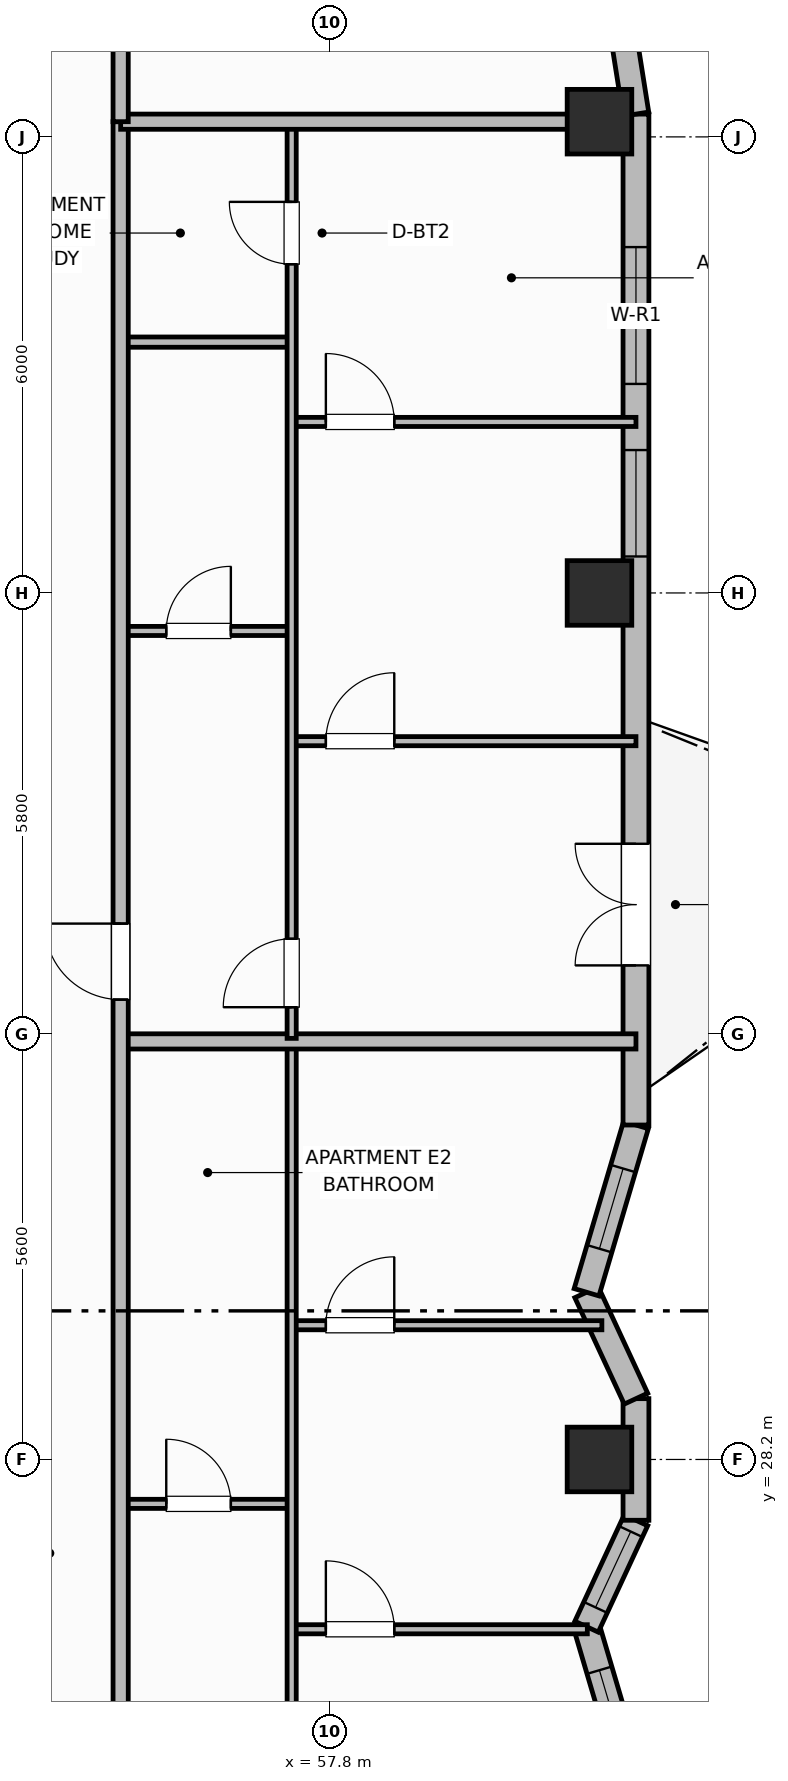
"""IFC4 building model, lengths in metres.
Left out: names, types, materials, properties, quantities, classifications, styles, units other than length and angle.
Written with IfcOpenShell. Run it as: python <this file> out.ifc"""

import sys

from ifc_helpers import new_model, si_unit, direction, frame, frame_2d, origin, origin_2d, place, context, subcontext, project, spatial, rectangle, extrude, element, fill, save


model = new_model("IFC4")
c1 = context("Model", 3, precision=1e-05, world=origin(), true_north=direction((0.0, 1.0)))
c2 = subcontext(c1, "Body", "Model", "MODEL_VIEW")
j1 = project(units=[si_unit("LENGTHUNIT", "METRE"), si_unit("PLANEANGLEUNIT", "RADIAN")], contexts=[c1])
p1 = place(None, origin())
s1 = spatial("IfcSite", under=j1, at=p1, CompositionType="ELEMENT")
p2 = place(p1, origin())
s2 = spatial("IfcBuilding", under=s1, at=p2, CompositionType="ELEMENT")
p3 = place(p2, frame((0.0, 0.0, 214.7)))
s3 = spatial("IfcBuildingStorey", under=s2, at=p3, CompositionType="ELEMENT", Elevation=214.7)
for number, where, z_axis, x_axis in (
    (1, (61.35, 28.2, 0.0), (0.0, 0.0, 1.0), (1.0, 0.0, 0.0)),
    (2, (61.35, 39.6, 0.0), (0.0, 0.0, 1.0), (1.0, 0.0, 0.0)),
    (3, (61.35, 45.8, 0.0), (0.0, 0.0, 1.0), (1.0, 0.0, 0.0)),
):
    element("IfcColumn", number, at=place(p3, frame(where, z_axis=z_axis, x_axis=x_axis)), inside=s3, PredefinedType="COLUMN", context=c2, shape_type="SweptSolid", body=[
        extrude(rectangle(XDim=0.85, YDim=0.85, at=origin_2d()), origin(), (0.0, 0.0, 1.0), 3.7),
    ])
p4 = place(p3, frame((61.83, 23.8, 0.0), z_axis=(0.0, 0.0, 1.0), x_axis=(-0.283410652833, 0.958998645391, 0.0)))
e4 = element("IfcWall", 4, at=p4, inside=s3, PredefinedType="SOLIDWALL", context=c2, shape_type="SweptSolid", body=[
    extrude(rectangle(XDim=2.294, YDim=0.34, at=frame_2d((1.147, 0.0))), origin(), (0.0, 0.0, 1.0), 2.72),
])
p5 = place(p4, frame((0.597, 0.0, 0.91)))
e5 = element("IfcOpeningElement", 5, at=p5, cuts=e4, PredefinedType="OPENING", context=c2, shape_type="SweptSolid", body=[
    extrude(rectangle(XDim=1.1, YDim=1.65, at=frame_2d((0.55, 0.825))), frame((0.0, 0.18, 0.0), z_axis=(0.0, -1.0, 0.0), x_axis=(1.0, 0.0, 0.0)), (0.0, 0.0, 1.0), 0.36),
])
p6 = place(p3, frame((61.18, 26.0, 0.0), z_axis=(0.0, 0.0, 1.0), x_axis=(0.421213543339, 0.906961493619, 0.0)))
e6 = element("IfcWall", 6, at=p6, inside=s3, PredefinedType="SOLIDWALL", context=c2, shape_type="SweptSolid", body=[
    extrude(rectangle(XDim=1.543, YDim=0.34, at=frame_2d((0.772, 0.0))), origin(), (0.0, 0.0, 1.0), 2.72),
])
p7 = place(p6, frame((0.28, 0.0, 0.91)))
e7 = element("IfcOpeningElement", 7, at=p7, cuts=e6, PredefinedType="OPENING", context=c2, shape_type="SweptSolid", body=[
    extrude(rectangle(XDim=1.1, YDim=1.65, at=frame_2d((0.55, 0.825))), frame((0.0, 0.18, 0.0), z_axis=(0.0, -1.0, 0.0), x_axis=(1.0, 0.0, 0.0)), (0.0, 0.0, 1.0), 0.36),
])
p8 = place(p3, frame((61.83, 27.4, 0.0), z_axis=(0.0, 0.0, 1.0), x_axis=(0.0, 1.0, 0.0)))
e8 = element("IfcWall", 8, at=p8, inside=s3, PredefinedType="SOLIDWALL", context=c2, shape_type="SweptSolid", body=[
    extrude(rectangle(XDim=1.6, YDim=0.34, at=frame_2d((0.8, 0.0))), origin(), (0.0, 0.0, 1.0), 2.72),
])
p9 = place(p3, frame((61.83, 29.0, 0.0), z_axis=(0.0, 0.0, 1.0), x_axis=(-0.421213543339, 0.906961493619, 0.0)))
e9 = element("IfcWall", 9, at=p9, inside=s3, PredefinedType="SOLIDWALL", context=c2, shape_type="SweptSolid", body=[
    extrude(rectangle(XDim=1.543, YDim=0.34, at=frame_2d((0.772, 0.0))), origin(), (0.0, 0.0, 1.0), 2.72),
])
p10 = place(p3, frame((61.18, 30.4, 0.0), z_axis=(0.0, 0.0, 1.0), x_axis=(0.283381730269, 0.959007192335, 0.0)))
e10 = element("IfcWall", 10, at=p10, inside=s3, PredefinedType="SOLIDWALL", context=c2, shape_type="SweptSolid", body=[
    extrude(rectangle(XDim=2.294, YDim=0.34, at=frame_2d((1.147, 0.0))), origin(), (0.0, 0.0, 1.0), 2.72),
])
p11 = place(p10, frame((0.597, 0.0, 0.91)))
e11 = element("IfcOpeningElement", 11, at=p11, cuts=e10, PredefinedType="OPENING", context=c2, shape_type="SweptSolid", body=[
    extrude(rectangle(XDim=1.1, YDim=1.65, at=frame_2d((0.55, 0.825))), frame((0.0, 0.18, 0.0), z_axis=(0.0, -1.0, 0.0), x_axis=(1.0, 0.0, 0.0)), (0.0, 0.0, 1.0), 0.36),
])
p12 = place(p3, frame((61.83, 32.6, 0.0), z_axis=(0.0, 0.0, 1.0), x_axis=(0.0, 1.0, 0.0)))
e12 = element("IfcWall", 12, at=p12, inside=s3, PredefinedType="SOLIDWALL", context=c2, shape_type="SweptSolid", body=[
    extrude(rectangle(XDim=13.3, YDim=0.34, at=frame_2d((6.65, 0.0))), origin(), (0.0, 0.0, 1.0), 2.72),
])
p13 = place(p12, frame((2.1, 0.0, 0.0)))
e13 = element("IfcOpeningElement", 13, at=p13, cuts=e12, PredefinedType="OPENING", context=c2, shape_type="SweptSolid", body=[
    extrude(rectangle(XDim=1.6, YDim=2.1, at=frame_2d((0.8, 1.05))), frame((0.0, 0.18, 0.0), z_axis=(0.0, -1.0, 0.0), x_axis=(1.0, 0.0, 0.0)), (0.0, 0.0, 1.0), 0.36),
])
p14 = place(p12, frame((7.48, 0.0, 0.71)))
e14 = element("IfcOpeningElement", 14, at=p14, cuts=e12, PredefinedType="OPENING", context=c2, shape_type="SweptSolid", body=[
    extrude(rectangle(XDim=1.4, YDim=1.85, at=frame_2d((0.7, 0.925))), frame((0.0, 0.18, 0.0), z_axis=(0.0, -1.0, 0.0), x_axis=(1.0, 0.0, 0.0)), (0.0, 0.0, 1.0), 0.36),
])
p15 = place(p12, frame((9.75, 0.0, 0.75)))
e15 = element("IfcOpeningElement", 15, at=p15, cuts=e12, PredefinedType="OPENING", context=c2, shape_type="SweptSolid", body=[
    extrude(rectangle(XDim=1.8, YDim=1.85, at=frame_2d((0.9, 0.925))), frame((0.0, 0.18, 0.0), z_axis=(0.0, -1.0, 0.0), x_axis=(1.0, 0.0, 0.0)), (0.0, 0.0, 1.0), 0.36),
])
p16 = place(p3, frame((61.83, 45.9, 0.0), z_axis=(0.0, 0.0, 1.0), x_axis=(-0.156481329164, 0.987680916907, 0.0)))
e16 = element("IfcWall", 16, at=p16, inside=s3, PredefinedType="SOLIDWALL", context=c2, shape_type="SweptSolid", body=[
    extrude(rectangle(XDim=1.136, YDim=0.34, at=frame_2d((0.568, 0.0))), origin(), (0.0, 0.0, 1.0), 2.72),
])
p17 = place(p3, frame((55.05, 27.616, 0.0), z_axis=(0.0, 0.0, 1.0), x_axis=(1.0, 0.0, 0.0)))
e17 = element("IfcWall", 17, at=p17, inside=s3, PredefinedType="PARTITIONING", context=c2, shape_type="SweptSolid", body=[
    extrude(rectangle(XDim=2.25, YDim=0.12, at=frame_2d((1.125, 0.0))), origin(), (0.0, 0.0, 1.0), 2.55),
])
p18 = place(p17, frame((0.6, 0.0, 0.0)))
e18 = element("IfcOpeningElement", 18, at=p18, cuts=e17, PredefinedType="OPENING", context=c2, shape_type="SweptSolid", body=[
    extrude(rectangle(XDim=0.85, YDim=2.1, at=frame_2d((0.425, 1.05))), frame((0.0, 0.07, 0.0), z_axis=(0.0, -1.0, 0.0), x_axis=(1.0, 0.0, 0.0)), (0.0, 0.0, 1.0), 0.14),
])
p19 = place(p3, frame((57.3, 25.966, 0.0), z_axis=(0.0, 0.0, 1.0), x_axis=(1.0, 0.0, 0.0)))
e19 = element("IfcWall", 19, at=p19, inside=s3, PredefinedType="PARTITIONING", context=c2, shape_type="SweptSolid", body=[
    extrude(rectangle(XDim=3.89, YDim=0.12, at=frame_2d((1.945, 0.0))), origin(), (0.0, 0.0, 1.0), 2.55),
])
p20 = place(p19, frame((0.45, 0.0, 0.0)))
e20 = element("IfcOpeningElement", 20, at=p20, cuts=e19, PredefinedType="OPENING", context=c2, shape_type="SweptSolid", body=[
    extrude(rectangle(XDim=0.9, YDim=2.1, at=frame_2d((0.45, 1.05))), frame((0.0, 0.07, 0.0), z_axis=(0.0, -1.0, 0.0), x_axis=(1.0, 0.0, 0.0)), (0.0, 0.0, 1.0), 0.14),
])
p21 = place(p3, frame((57.3, 29.966, 0.0), z_axis=(0.0, 0.0, 1.0), x_axis=(1.0, 0.0, 0.0)))
e21 = element("IfcWall", 21, at=p21, inside=s3, PredefinedType="PARTITIONING", context=c2, shape_type="SweptSolid", body=[
    extrude(rectangle(XDim=4.082, YDim=0.12, at=frame_2d((2.041, 0.0))), origin(), (0.0, 0.0, 1.0), 2.55),
])
p22 = place(p21, frame((0.45, 0.0, 0.0)))
e22 = element("IfcOpeningElement", 22, at=p22, cuts=e21, PredefinedType="OPENING", context=c2, shape_type="SweptSolid", body=[
    extrude(rectangle(XDim=0.9, YDim=2.1, at=frame_2d((0.45, 1.05))), frame((0.0, 0.07, 0.0), z_axis=(0.0, -1.0, 0.0), x_axis=(1.0, 0.0, 0.0)), (0.0, 0.0, 1.0), 0.14),
])
p23 = place(p3, frame((57.3, 22.256, 0.0), z_axis=(0.0, 0.0, 1.0), x_axis=(0.0, 1.0, 0.0)))
e23 = element("IfcWall", 23, at=p23, inside=s3, PredefinedType="PARTITIONING", context=c2, shape_type="SweptSolid", body=[
    extrude(rectangle(XDim=11.404, YDim=0.12, at=frame_2d((5.702, 0.0))), origin(), (0.0, 0.0, 1.0), 2.55),
])
p24 = place(p23, frame((0.41, 0.0, 0.0)))
e24 = element("IfcOpeningElement", 24, at=p24, cuts=e23, PredefinedType="OPENING", context=c2, shape_type="SweptSolid", body=[
    extrude(rectangle(XDim=0.9, YDim=2.1, at=frame_2d((0.45, 1.05))), frame((0.0, 0.07, 0.0), z_axis=(0.0, -1.0, 0.0), x_axis=(1.0, 0.0, 0.0)), (0.0, 0.0, 1.0), 0.14),
])
p25 = place(p3, frame((55.05, 33.7, 0.0), z_axis=(0.0, 0.0, 1.0), x_axis=(1.0, 0.0, 0.0)))
e25 = element("IfcWall", 25, at=p25, inside=s3, PredefinedType="PARTITIONING", context=c2, shape_type="SweptSolid", body=[
    extrude(rectangle(XDim=6.78, YDim=0.2, at=frame_2d((3.39, 0.0))), origin(), (0.0, 0.0, 1.0), 2.55),
])
p26 = place(p3, frame((55.05, 39.1, 0.0), z_axis=(0.0, 0.0, 1.0), x_axis=(1.0, 0.0, 0.0)))
e26 = element("IfcWall", 26, at=p26, inside=s3, PredefinedType="PARTITIONING", context=c2, shape_type="SweptSolid", body=[
    extrude(rectangle(XDim=2.25, YDim=0.12, at=frame_2d((1.125, 0.0))), origin(), (0.0, 0.0, 1.0), 2.55),
])
p27 = place(p26, frame((0.6, 0.0, 0.0)))
e27 = element("IfcOpeningElement", 27, at=p27, cuts=e26, PredefinedType="OPENING", context=c2, shape_type="SweptSolid", body=[
    extrude(rectangle(XDim=0.85, YDim=2.1, at=frame_2d((0.425, 1.05))), frame((0.0, 0.07, 0.0), z_axis=(0.0, -1.0, 0.0), x_axis=(1.0, 0.0, 0.0)), (0.0, 0.0, 1.0), 0.14),
])
p28 = place(p3, frame((55.05, 42.9, 0.0), z_axis=(0.0, 0.0, 1.0), x_axis=(1.0, 0.0, 0.0)))
e28 = element("IfcWall", 28, at=p28, inside=s3, PredefinedType="PARTITIONING", context=c2, shape_type="SweptSolid", body=[
    extrude(rectangle(XDim=2.25, YDim=0.135, at=frame_2d((1.125, 0.0))), origin(), (0.0, 0.0, 1.0), 2.55),
])
p29 = place(p3, frame((57.3, 37.65, 0.0), z_axis=(0.0, 0.0, 1.0), x_axis=(1.0, 0.0, 0.0)))
e29 = element("IfcWall", 29, at=p29, inside=s3, PredefinedType="PARTITIONING", context=c2, shape_type="SweptSolid", body=[
    extrude(rectangle(XDim=4.53, YDim=0.12, at=frame_2d((2.265, 0.0))), origin(), (0.0, 0.0, 1.0), 2.55),
])
p30 = place(p29, frame((0.45, 0.0, 0.0)))
e30 = element("IfcOpeningElement", 30, at=p30, cuts=e29, PredefinedType="OPENING", context=c2, shape_type="SweptSolid", body=[
    extrude(rectangle(XDim=0.9, YDim=2.1, at=frame_2d((0.45, 1.05))), frame((0.0, 0.07, 0.0), z_axis=(0.0, -1.0, 0.0), x_axis=(1.0, 0.0, 0.0)), (0.0, 0.0, 1.0), 0.14),
])
p31 = place(p3, frame((57.3, 41.85, 0.0), z_axis=(0.0, 0.0, 1.0), x_axis=(1.0, 0.0, 0.0)))
e31 = element("IfcWall", 31, at=p31, inside=s3, PredefinedType="PARTITIONING", context=c2, shape_type="SweptSolid", body=[
    extrude(rectangle(XDim=4.53, YDim=0.12, at=frame_2d((2.265, 0.0))), origin(), (0.0, 0.0, 1.0), 2.55),
])
p32 = place(p31, frame((0.45, 0.0, 0.0)))
e32 = element("IfcOpeningElement", 32, at=p32, cuts=e31, PredefinedType="OPENING", context=c2, shape_type="SweptSolid", body=[
    extrude(rectangle(XDim=0.9, YDim=2.1, at=frame_2d((0.45, 1.05))), frame((0.0, 0.07, 0.0), z_axis=(0.0, -1.0, 0.0), x_axis=(1.0, 0.0, 0.0)), (0.0, 0.0, 1.0), 0.14),
])
p33 = place(p3, frame((57.3, 33.74, 0.0), z_axis=(0.0, 0.0, 1.0), x_axis=(0.0, 1.0, 0.0)))
e33 = element("IfcWall", 33, at=p33, inside=s3, PredefinedType="PARTITIONING", context=c2, shape_type="SweptSolid", body=[
    extrude(rectangle(XDim=12.02, YDim=0.12, at=frame_2d((6.01, 0.0))), origin(), (0.0, 0.0, 1.0), 2.55),
])
p34 = place(p33, frame((0.41, 0.0, 0.0)))
e34 = element("IfcOpeningElement", 34, at=p34, cuts=e33, PredefinedType="OPENING", context=c2, shape_type="SweptSolid", body=[
    extrude(rectangle(XDim=0.9, YDim=2.1, at=frame_2d((0.45, 1.05))), frame((0.0, 0.07, 0.0), z_axis=(0.0, -1.0, 0.0), x_axis=(1.0, 0.0, 0.0)), (0.0, 0.0, 1.0), 0.14),
])
p35 = place(p33, frame((10.185, 0.0, 0.0)))
e35 = element("IfcOpeningElement", 35, at=p35, cuts=e33, PredefinedType="OPENING", context=c2, shape_type="SweptSolid", body=[
    extrude(rectangle(XDim=0.82, YDim=2.08, at=frame_2d((0.41, 1.04))), frame((0.0, 0.07, 0.0), z_axis=(0.0, -1.0, 0.0), x_axis=(1.0, 0.0, 0.0)), (0.0, 0.0, 1.0), 0.14),
])
p36 = place(p3, frame((55.05, 10.6, 0.0), z_axis=(0.0, 0.0, 1.0), x_axis=(0.0, 1.0, 0.0)))
e36 = element("IfcWall", 36, at=p36, inside=s3, PredefinedType="PARTITIONING", context=c2, shape_type="SweptSolid", body=[
    extrude(rectangle(XDim=35.2, YDim=0.2, at=frame_2d((17.6, 0.0))), origin(), (0.0, 0.0, 1.0), 2.55),
])
p37 = place(p36, frame((2.65, 0.0, 0.0)))
e37 = element("IfcOpeningElement", 37, at=p37, cuts=e36, PredefinedType="OPENING", context=c2, shape_type="SweptSolid", body=[
    extrude(rectangle(XDim=1.0, YDim=2.15, at=frame_2d((0.5, 1.075))), frame((0.0, 0.11, 0.0), z_axis=(0.0, -1.0, 0.0), x_axis=(1.0, 0.0, 0.0)), (0.0, 0.0, 1.0), 0.22),
])
p38 = place(p36, frame((12.166, 0.0, 0.0)))
e38 = element("IfcOpeningElement", 38, at=p38, cuts=e36, PredefinedType="OPENING", context=c2, shape_type="SweptSolid", body=[
    extrude(rectangle(XDim=1.0, YDim=2.15, at=frame_2d((0.5, 1.075))), frame((0.0, 0.11, 0.0), z_axis=(0.0, -1.0, 0.0), x_axis=(1.0, 0.0, 0.0)), (0.0, 0.0, 1.0), 0.22),
])
p39 = place(p36, frame((23.65, 0.0, 0.0)))
e39 = element("IfcOpeningElement", 39, at=p39, cuts=e36, PredefinedType="OPENING", context=c2, shape_type="SweptSolid", body=[
    extrude(rectangle(XDim=1.0, YDim=2.15, at=frame_2d((0.5, 1.075))), frame((0.0, 0.11, 0.0), z_axis=(0.0, -1.0, 0.0), x_axis=(1.0, 0.0, 0.0)), (0.0, 0.0, 1.0), 0.22),
])
p40 = place(p3, frame((55.05, 45.8, 0.0), z_axis=(0.0, 0.0, 1.0), x_axis=(1.0, 0.0, 0.0)))
e40 = element("IfcWall", 40, at=p40, inside=s3, PredefinedType="PARTITIONING", context=c2, shape_type="SweptSolid", body=[
    extrude(rectangle(XDim=6.36, YDim=0.2, at=frame_2d((3.18, 0.0))), origin(), (0.0, 0.0, 1.0), 2.55),
])
p41 = place(p3, frame((55.05, 45.8, 0.0), z_axis=(0.0, 0.0, 1.0), x_axis=(0.0, 1.0, 0.0)))
e41 = element("IfcWall", 41, at=p41, inside=s3, PredefinedType="PARTITIONING", context=c2, shape_type="SweptSolid", body=[
    extrude(rectangle(XDim=3.73, YDim=0.2, at=frame_2d((1.865, 0.0))), origin(), (0.0, 0.0, 1.0), 2.55),
])
p42 = place(p5, origin())
e42 = element("IfcWindow", 42, at=p42, inside=s3, PartitioningType="SINGLE_PANEL", PredefinedType="WINDOW", context=c2, shape_type="SweptSolid", body=[
    extrude(rectangle(XDim=1.1, YDim=1.65, at=frame_2d((0.55, 0.825))), frame((0.0, 0.03, 0.0), z_axis=(0.0, -1.0, 0.0), x_axis=(1.0, 0.0, 0.0)), (0.0, 0.0, 1.0), 0.06),
])
fill(e5, e42)
p43 = place(p7, origin())
e43 = element("IfcWindow", 43, at=p43, inside=s3, PartitioningType="SINGLE_PANEL", PredefinedType="WINDOW", context=c2, shape_type="SweptSolid", body=[
    extrude(rectangle(XDim=1.1, YDim=1.65, at=frame_2d((0.55, 0.825))), frame((0.0, 0.03, 0.0), z_axis=(0.0, -1.0, 0.0), x_axis=(1.0, 0.0, 0.0)), (0.0, 0.0, 1.0), 0.06),
])
fill(e7, e43)
p44 = place(p11, origin())
e44 = element("IfcWindow", 44, at=p44, inside=s3, PartitioningType="SINGLE_PANEL", PredefinedType="WINDOW", context=c2, shape_type="SweptSolid", body=[
    extrude(rectangle(XDim=1.1, YDim=1.65, at=frame_2d((0.55, 0.825))), frame((0.0, 0.03, 0.0), z_axis=(0.0, -1.0, 0.0), x_axis=(1.0, 0.0, 0.0)), (0.0, 0.0, 1.0), 0.06),
])
fill(e11, e44)
p45 = place(p13, origin())
e45 = element("IfcDoor", 45, at=p45, inside=s3, OperationType="DOUBLE_DOOR_SINGLE_SWING", PredefinedType="DOOR", context=c2, shape_type="SweptSolid", body=[
    extrude(rectangle(XDim=1.6, YDim=2.1, at=frame_2d((0.8, 1.05))), frame((0.0, 0.025, 0.0), z_axis=(0.0, -1.0, 0.0), x_axis=(1.0, 0.0, 0.0)), (0.0, 0.0, 1.0), 0.05),
])
fill(e13, e45)
p46 = place(p14, origin())
e46 = element("IfcWindow", 46, at=p46, inside=s3, PartitioningType="SINGLE_PANEL", PredefinedType="WINDOW", context=c2, shape_type="SweptSolid", body=[
    extrude(rectangle(XDim=1.4, YDim=1.85, at=frame_2d((0.7, 0.925))), frame((0.0, 0.03, 0.0), z_axis=(0.0, -1.0, 0.0), x_axis=(1.0, 0.0, 0.0)), (0.0, 0.0, 1.0), 0.06),
])
fill(e14, e46)
p47 = place(p15, origin())
e47 = element("IfcWindow", 47, at=p47, inside=s3, PartitioningType="SINGLE_PANEL", PredefinedType="WINDOW", context=c2, shape_type="SweptSolid", body=[
    extrude(rectangle(XDim=1.8, YDim=1.85, at=frame_2d((0.9, 0.925))), frame((0.0, 0.03, 0.0), z_axis=(0.0, -1.0, 0.0), x_axis=(1.0, 0.0, 0.0)), (0.0, 0.0, 1.0), 0.06),
])
fill(e15, e47)
p48 = place(p18, origin())
e48 = element("IfcDoor", 48, at=p48, inside=s3, OperationType="SINGLE_SWING_LEFT", PredefinedType="DOOR", context=c2, shape_type="SweptSolid", body=[
    extrude(rectangle(XDim=0.85, YDim=2.1, at=frame_2d((0.425, 1.05))), frame((0.0, 0.025, 0.0), z_axis=(0.0, -1.0, 0.0), x_axis=(1.0, 0.0, 0.0)), (0.0, 0.0, 1.0), 0.05),
])
fill(e18, e48)
p49 = place(p20, origin())
e49 = element("IfcDoor", 49, at=p49, inside=s3, OperationType="SINGLE_SWING_LEFT", PredefinedType="DOOR", context=c2, shape_type="SweptSolid", body=[
    extrude(rectangle(XDim=0.9, YDim=2.1, at=frame_2d((0.45, 1.05))), frame((0.0, 0.025, 0.0), z_axis=(0.0, -1.0, 0.0), x_axis=(1.0, 0.0, 0.0)), (0.0, 0.0, 1.0), 0.05),
])
fill(e20, e49)
p50 = place(p22, origin())
e50 = element("IfcDoor", 50, at=p50, inside=s3, OperationType="SINGLE_SWING_RIGHT", PredefinedType="DOOR", context=c2, shape_type="SweptSolid", body=[
    extrude(rectangle(XDim=0.9, YDim=2.1, at=frame_2d((0.45, 1.05))), frame((0.0, 0.025, 0.0), z_axis=(0.0, -1.0, 0.0), x_axis=(1.0, 0.0, 0.0)), (0.0, 0.0, 1.0), 0.05),
])
fill(e22, e50)
p51 = place(p27, origin())
e51 = element("IfcDoor", 51, at=p51, inside=s3, OperationType="SINGLE_SWING_RIGHT", PredefinedType="DOOR", context=c2, shape_type="SweptSolid", body=[
    extrude(rectangle(XDim=0.85, YDim=2.1, at=frame_2d((0.425, 1.05))), frame((0.0, 0.025, 0.0), z_axis=(0.0, -1.0, 0.0), x_axis=(1.0, 0.0, 0.0)), (0.0, 0.0, 1.0), 0.05),
])
fill(e27, e51)
p52 = place(p30, origin())
e52 = element("IfcDoor", 52, at=p52, inside=s3, OperationType="SINGLE_SWING_RIGHT", PredefinedType="DOOR", context=c2, shape_type="SweptSolid", body=[
    extrude(rectangle(XDim=0.9, YDim=2.1, at=frame_2d((0.45, 1.05))), frame((0.0, 0.025, 0.0), z_axis=(0.0, -1.0, 0.0), x_axis=(1.0, 0.0, 0.0)), (0.0, 0.0, 1.0), 0.05),
])
fill(e30, e52)
p53 = place(p32, origin())
e53 = element("IfcDoor", 53, at=p53, inside=s3, OperationType="SINGLE_SWING_LEFT", PredefinedType="DOOR", context=c2, shape_type="SweptSolid", body=[
    extrude(rectangle(XDim=0.9, YDim=2.1, at=frame_2d((0.45, 1.05))), frame((0.0, 0.025, 0.0), z_axis=(0.0, -1.0, 0.0), x_axis=(1.0, 0.0, 0.0)), (0.0, 0.0, 1.0), 0.05),
])
fill(e32, e53)
p54 = place(p34, origin())
e54 = element("IfcDoor", 54, at=p54, inside=s3, OperationType="SINGLE_SWING_LEFT", PredefinedType="DOOR", context=c2, shape_type="SweptSolid", body=[
    extrude(rectangle(XDim=0.9, YDim=2.1, at=frame_2d((0.45, 1.05))), frame((0.0, 0.025, 0.0), z_axis=(0.0, -1.0, 0.0), x_axis=(1.0, 0.0, 0.0)), (0.0, 0.0, 1.0), 0.05),
])
fill(e34, e54)
p55 = place(p35, origin())
e55 = element("IfcDoor", 55, at=p55, inside=s3, OperationType="SINGLE_SWING_RIGHT", PredefinedType="DOOR", context=c2, shape_type="SweptSolid", body=[
    extrude(rectangle(XDim=0.82, YDim=2.08, at=frame_2d((0.41, 1.04))), frame((0.0, 0.025, 0.0), z_axis=(0.0, -1.0, 0.0), x_axis=(1.0, 0.0, 0.0)), (0.0, 0.0, 1.0), 0.05),
])
fill(e35, e55)
p56 = place(p39, origin())
e56 = element("IfcDoor", 56, at=p56, inside=s3, OperationType="SINGLE_SWING_RIGHT", PredefinedType="DOOR", context=c2, shape_type="SweptSolid", body=[
    extrude(rectangle(XDim=1.0, YDim=2.15, at=frame_2d((0.5, 1.075))), frame((0.0, 0.025, 0.0), z_axis=(0.0, -1.0, 0.0), x_axis=(1.0, 0.0, 0.0)), (0.0, 0.0, 1.0), 0.05),
])
fill(e39, e56)
save(model, sys.argv[1])
